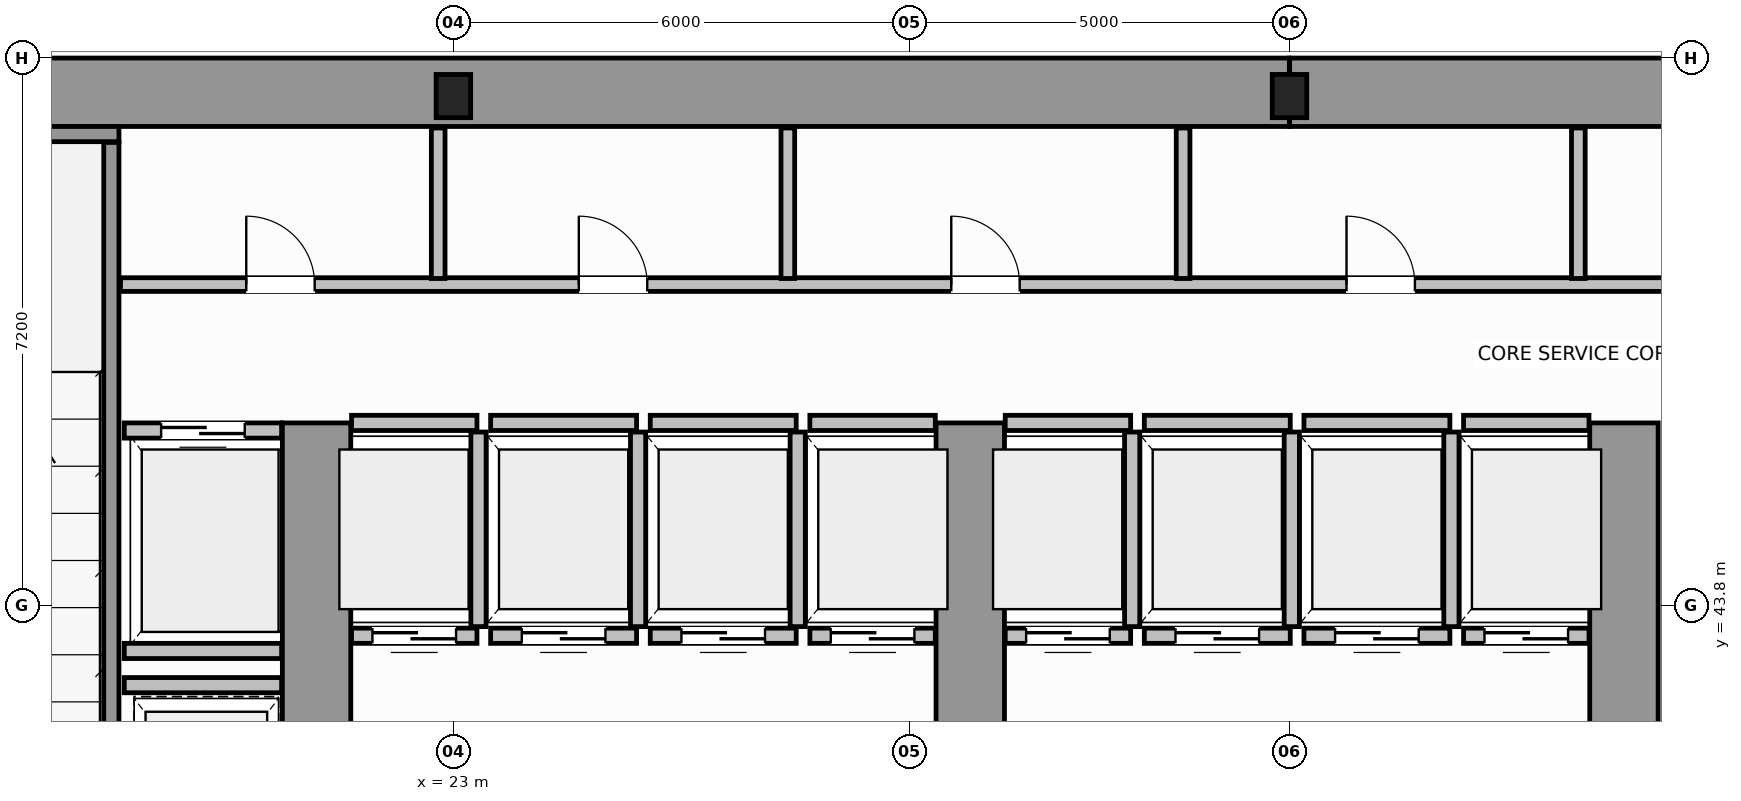
"""IFC4 building model, lengths in metres.
Left out: names, types, materials, properties, quantities, classifications, styles, units other than length and angle.
Written with IfcOpenShell. Run it as: python <this file> out.ifc"""

import sys

from ifc_helpers import new_model, si_unit, direction, frame, frame_2d, origin, origin_2d, place, context, subcontext, project, spatial, rectangle, i_section, extrude, source, transform, mapped, element, fill, save


model = new_model("IFC4")
c1 = context("Model", 3, precision=1e-05, world=origin(), true_north=direction((0.0, 1.0)))
c2 = subcontext(c1, "Body", "Model", "MODEL_VIEW")
j1 = project(units=[si_unit("LENGTHUNIT", "METRE"), si_unit("PLANEANGLEUNIT", "RADIAN")], contexts=[c1])
p1 = place(None, origin())
s1 = spatial("IfcSite", under=j1, at=p1, CompositionType="ELEMENT")
p2 = place(p1, origin())
s2 = spatial("IfcBuilding", under=s1, at=p2, CompositionType="ELEMENT")
p3 = place(p2, origin())
s3 = spatial("IfcBuildingStorey", under=s2, at=p3, CompositionType="ELEMENT", Elevation=0.0)
m1 = source(origin(), c2, "Body", "SweptSolid", [
    extrude(i_section(OverallWidth=0.454, OverallDepth=0.569, WebThickness=0.078, FlangeThickness=0.08, FilletRadius=0.015, at=origin_2d()), origin(), (0.0, 0.0, 1.0), 5.6),
])
for number, where, z_axis, x_axis in (
    (1, (23.0, 50.5, 0.0), (0.0, 0.0, 1.0), (1.0, 0.0, 0.0)),
    (2, (34.0, 50.5, 0.0), (0.0, 0.0, 1.0), (1.0, 0.0, 0.0)),
):
    element("IfcColumn", number, at=place(p3, frame(where, z_axis=z_axis, x_axis=x_axis)), inside=s3, PredefinedType="COLUMN", context=c2, shape_type="MappedRepresentation", body=[
        mapped(m1, transform((0.0, 0.0, 0.0), scale=1.0)),
    ])
for number, where, z_axis, x_axis in (
    (3, (14.454, 50.55, 0.0), (0.0, 0.0, 1.0), (1.0, 0.0, 0.0)),
    (4, (34.002, 50.55, 0.0), (0.0, 0.0, 1.0), (1.0, 0.0, 0.0)),
):
    element("IfcWall", number, at=place(p3, frame(where, z_axis=z_axis, x_axis=x_axis)), inside=s3, PredefinedType="SHEAR", context=c2, shape_type="SweptSolid", body=[
        extrude(rectangle(XDim=19.544, YDim=0.9, at=frame_2d((9.772, 0.0))), origin(), (0.0, 0.0, 1.0), 5.6),
    ])
for number, where, z_axis, x_axis in (
    (5, (21.2, 36.97, 0.0), (0.0, 0.0, 1.0), (0.0, 1.0, 0.0)),
    (6, (29.8, 36.97, 0.0), (0.0, 0.0, 1.0), (0.0, 1.0, 0.0)),
    (7, (38.4, 36.97, 0.0), (0.0, 0.0, 1.0), (0.0, 1.0, 0.0)),
):
    element("IfcWall", number, at=place(p3, frame(where, z_axis=z_axis, x_axis=x_axis)), inside=s3, PredefinedType="SHEAR", context=c2, shape_type="SweptSolid", body=[
        extrude(rectangle(XDim=9.23, YDim=0.9, at=frame_2d((4.615, 0.0))), origin(), (0.0, 0.0, 1.0), 5.6),
    ])
p4 = place(p3, frame((14.45, 50.0, 0.0), z_axis=(0.0, 0.0, 1.0), x_axis=(1.0, 0.0, 0.0)))
e8 = element("IfcWall", 8, at=p4, inside=s3, PredefinedType="SOLIDWALL", context=c2, shape_type="SweptSolid", body=[
    extrude(rectangle(XDim=4.15, YDim=0.2, at=frame_2d((2.075, 0.0))), origin(), (0.0, 0.0, 1.0), 5.6),
])
p5 = place(p3, frame((18.5, 39.96, 0.0), z_axis=(0.0, 0.0, 1.0), x_axis=(0.0, 1.0, 0.0)))
e9 = element("IfcWall", 9, at=p5, inside=s3, PredefinedType="SOLIDWALL", context=c2, shape_type="SweptSolid", body=[
    extrude(rectangle(XDim=9.93, YDim=0.2, at=frame_2d((4.965, 0.0))), origin(), (0.0, 0.0, 1.0), 5.6),
])
p6 = place(p3, frame((21.66, 43.4, 0.0), z_axis=(0.0, 0.0, 1.0), x_axis=(1.0, 0.0, 0.0)))
e10 = element("IfcWall", 10, at=p6, inside=s3, PredefinedType="SOLIDWALL", context=c2, shape_type="SweptSolid", body=[
    extrude(rectangle(XDim=1.65, YDim=0.2, at=frame_2d((0.825, 0.0))), origin(), (0.0, 0.0, 1.0), 5.32),
])
p7 = place(p6, frame((0.275, 0.0, 0.0)))
e11 = element("IfcOpeningElement", 11, at=p7, cuts=e10, PredefinedType="OPENING", context=c2, shape_type="SweptSolid", body=[
    extrude(rectangle(XDim=1.1, YDim=2.15, at=frame_2d((0.55, 1.075))), frame((0.0, 0.11, 0.0), z_axis=(0.0, -1.0, 0.0), x_axis=(1.0, 0.0, 0.0)), (0.0, 0.0, 1.0), 0.22),
])
p8 = place(p3, frame((21.66, 46.2, 0.0), z_axis=(0.0, 0.0, 1.0), x_axis=(1.0, 0.0, 0.0)))
e12 = element("IfcWall", 12, at=p8, inside=s3, PredefinedType="SOLIDWALL", context=c2, shape_type="SweptSolid", body=[
    extrude(rectangle(XDim=1.65, YDim=0.2, at=frame_2d((0.825, 0.0))), origin(), (0.0, 0.0, 1.0), 5.32),
])
p9 = place(p3, frame((23.33, 43.52, 0.0), z_axis=(0.0, 0.0, 1.0), x_axis=(0.0, 1.0, 0.0)))
e13 = element("IfcWall", 13, at=p9, inside=s3, PredefinedType="SOLIDWALL", context=c2, shape_type="SweptSolid", body=[
    extrude(rectangle(XDim=2.56, YDim=0.2, at=frame_2d((1.28, 0.0))), origin(), (0.0, 0.0, 1.0), 5.32),
])
p10 = place(p3, frame((23.49, 43.4, 0.0), z_axis=(0.0, 0.0, 1.0), x_axis=(1.0, 0.0, 0.0)))
e14 = element("IfcWall", 14, at=p10, inside=s3, PredefinedType="SOLIDWALL", context=c2, shape_type="SweptSolid", body=[
    extrude(rectangle(XDim=1.92, YDim=0.2, at=frame_2d((0.96, 0.0))), origin(), (0.0, 0.0, 1.0), 5.32),
])
p11 = place(p10, frame((0.41, 0.0, 0.0)))
e15 = element("IfcOpeningElement", 15, at=p11, cuts=e14, PredefinedType="OPENING", context=c2, shape_type="SweptSolid", body=[
    extrude(rectangle(XDim=1.1, YDim=2.15, at=frame_2d((0.55, 1.075))), frame((0.0, 0.11, 0.0), z_axis=(0.0, -1.0, 0.0), x_axis=(1.0, 0.0, 0.0)), (0.0, 0.0, 1.0), 0.22),
])
p12 = place(p3, frame((23.49, 46.2, 0.0), z_axis=(0.0, 0.0, 1.0), x_axis=(1.0, 0.0, 0.0)))
e16 = element("IfcWall", 16, at=p12, inside=s3, PredefinedType="SOLIDWALL", context=c2, shape_type="SweptSolid", body=[
    extrude(rectangle(XDim=1.92, YDim=0.2, at=frame_2d((0.96, 0.0))), origin(), (0.0, 0.0, 1.0), 5.32),
])
p13 = place(p3, frame((25.43, 43.52, 0.0), z_axis=(0.0, 0.0, 1.0), x_axis=(0.0, 1.0, 0.0)))
e17 = element("IfcWall", 17, at=p13, inside=s3, PredefinedType="SOLIDWALL", context=c2, shape_type="SweptSolid", body=[
    extrude(rectangle(XDim=2.56, YDim=0.2, at=frame_2d((1.28, 0.0))), origin(), (0.0, 0.0, 1.0), 5.32),
])
p14 = place(p3, frame((25.59, 43.4, 0.0), z_axis=(0.0, 0.0, 1.0), x_axis=(1.0, 0.0, 0.0)))
e18 = element("IfcWall", 18, at=p14, inside=s3, PredefinedType="SOLIDWALL", context=c2, shape_type="SweptSolid", body=[
    extrude(rectangle(XDim=1.92, YDim=0.2, at=frame_2d((0.96, 0.0))), origin(), (0.0, 0.0, 1.0), 5.32),
])
p15 = place(p14, frame((0.41, 0.0, 0.0)))
e19 = element("IfcOpeningElement", 19, at=p15, cuts=e18, PredefinedType="OPENING", context=c2, shape_type="SweptSolid", body=[
    extrude(rectangle(XDim=1.1, YDim=2.15, at=frame_2d((0.55, 1.075))), frame((0.0, 0.11, 0.0), z_axis=(0.0, -1.0, 0.0), x_axis=(1.0, 0.0, 0.0)), (0.0, 0.0, 1.0), 0.22),
])
p16 = place(p3, frame((25.59, 46.2, 0.0), z_axis=(0.0, 0.0, 1.0), x_axis=(1.0, 0.0, 0.0)))
e20 = element("IfcWall", 20, at=p16, inside=s3, PredefinedType="SOLIDWALL", context=c2, shape_type="SweptSolid", body=[
    extrude(rectangle(XDim=1.92, YDim=0.2, at=frame_2d((0.96, 0.0))), origin(), (0.0, 0.0, 1.0), 5.32),
])
p17 = place(p3, frame((27.53, 43.52, 0.0), z_axis=(0.0, 0.0, 1.0), x_axis=(0.0, 1.0, 0.0)))
e21 = element("IfcWall", 21, at=p17, inside=s3, PredefinedType="SOLIDWALL", context=c2, shape_type="SweptSolid", body=[
    extrude(rectangle(XDim=2.56, YDim=0.2, at=frame_2d((1.28, 0.0))), origin(), (0.0, 0.0, 1.0), 5.32),
])
p18 = place(p3, frame((27.69, 43.4, 0.0), z_axis=(0.0, 0.0, 1.0), x_axis=(1.0, 0.0, 0.0)))
e22 = element("IfcWall", 22, at=p18, inside=s3, PredefinedType="SOLIDWALL", context=c2, shape_type="SweptSolid", body=[
    extrude(rectangle(XDim=1.65, YDim=0.2, at=frame_2d((0.825, 0.0))), origin(), (0.0, 0.0, 1.0), 5.32),
])
p19 = place(p18, frame((0.275, 0.0, 0.0)))
e23 = element("IfcOpeningElement", 23, at=p19, cuts=e22, PredefinedType="OPENING", context=c2, shape_type="SweptSolid", body=[
    extrude(rectangle(XDim=1.1, YDim=2.15, at=frame_2d((0.55, 1.075))), frame((0.0, 0.11, 0.0), z_axis=(0.0, -1.0, 0.0), x_axis=(1.0, 0.0, 0.0)), (0.0, 0.0, 1.0), 0.22),
])
p20 = place(p3, frame((27.69, 46.2, 0.0), z_axis=(0.0, 0.0, 1.0), x_axis=(1.0, 0.0, 0.0)))
e24 = element("IfcWall", 24, at=p20, inside=s3, PredefinedType="SOLIDWALL", context=c2, shape_type="SweptSolid", body=[
    extrude(rectangle(XDim=1.65, YDim=0.2, at=frame_2d((0.825, 0.0))), origin(), (0.0, 0.0, 1.0), 5.32),
])
p21 = place(p3, frame((30.26, 43.4, 0.0), z_axis=(0.0, 0.0, 1.0), x_axis=(1.0, 0.0, 0.0)))
e25 = element("IfcWall", 25, at=p21, inside=s3, PredefinedType="SOLIDWALL", context=c2, shape_type="SweptSolid", body=[
    extrude(rectangle(XDim=1.65, YDim=0.2, at=frame_2d((0.825, 0.0))), origin(), (0.0, 0.0, 1.0), 5.32),
])
p22 = place(p21, frame((0.275, 0.0, 0.0)))
e26 = element("IfcOpeningElement", 26, at=p22, cuts=e25, PredefinedType="OPENING", context=c2, shape_type="SweptSolid", body=[
    extrude(rectangle(XDim=1.1, YDim=2.15, at=frame_2d((0.55, 1.075))), frame((0.0, 0.11, 0.0), z_axis=(0.0, -1.0, 0.0), x_axis=(1.0, 0.0, 0.0)), (0.0, 0.0, 1.0), 0.22),
])
p23 = place(p3, frame((30.26, 46.2, 0.0), z_axis=(0.0, 0.0, 1.0), x_axis=(1.0, 0.0, 0.0)))
e27 = element("IfcWall", 27, at=p23, inside=s3, PredefinedType="SOLIDWALL", context=c2, shape_type="SweptSolid", body=[
    extrude(rectangle(XDim=1.65, YDim=0.2, at=frame_2d((0.825, 0.0))), origin(), (0.0, 0.0, 1.0), 5.32),
])
p24 = place(p3, frame((31.93, 43.52, 0.0), z_axis=(0.0, 0.0, 1.0), x_axis=(0.0, 1.0, 0.0)))
e28 = element("IfcWall", 28, at=p24, inside=s3, PredefinedType="SOLIDWALL", context=c2, shape_type="SweptSolid", body=[
    extrude(rectangle(XDim=2.56, YDim=0.2, at=frame_2d((1.28, 0.0))), origin(), (0.0, 0.0, 1.0), 5.32),
])
p25 = place(p3, frame((32.09, 43.4, 0.0), z_axis=(0.0, 0.0, 1.0), x_axis=(1.0, 0.0, 0.0)))
e29 = element("IfcWall", 29, at=p25, inside=s3, PredefinedType="SOLIDWALL", context=c2, shape_type="SweptSolid", body=[
    extrude(rectangle(XDim=1.92, YDim=0.2, at=frame_2d((0.96, 0.0))), origin(), (0.0, 0.0, 1.0), 5.32),
])
p26 = place(p25, frame((0.41, 0.0, 0.0)))
e30 = element("IfcOpeningElement", 30, at=p26, cuts=e29, PredefinedType="OPENING", context=c2, shape_type="SweptSolid", body=[
    extrude(rectangle(XDim=1.1, YDim=2.15, at=frame_2d((0.55, 1.075))), frame((0.0, 0.11, 0.0), z_axis=(0.0, -1.0, 0.0), x_axis=(1.0, 0.0, 0.0)), (0.0, 0.0, 1.0), 0.22),
])
p27 = place(p3, frame((32.09, 46.2, 0.0), z_axis=(0.0, 0.0, 1.0), x_axis=(1.0, 0.0, 0.0)))
e31 = element("IfcWall", 31, at=p27, inside=s3, PredefinedType="SOLIDWALL", context=c2, shape_type="SweptSolid", body=[
    extrude(rectangle(XDim=1.92, YDim=0.2, at=frame_2d((0.96, 0.0))), origin(), (0.0, 0.0, 1.0), 5.32),
])
p28 = place(p3, frame((34.03, 43.52, 0.0), z_axis=(0.0, 0.0, 1.0), x_axis=(0.0, 1.0, 0.0)))
e32 = element("IfcWall", 32, at=p28, inside=s3, PredefinedType="SOLIDWALL", context=c2, shape_type="SweptSolid", body=[
    extrude(rectangle(XDim=2.56, YDim=0.2, at=frame_2d((1.28, 0.0))), origin(), (0.0, 0.0, 1.0), 5.32),
])
p29 = place(p3, frame((34.19, 43.4, 0.0), z_axis=(0.0, 0.0, 1.0), x_axis=(1.0, 0.0, 0.0)))
e33 = element("IfcWall", 33, at=p29, inside=s3, PredefinedType="SOLIDWALL", context=c2, shape_type="SweptSolid", body=[
    extrude(rectangle(XDim=1.92, YDim=0.2, at=frame_2d((0.96, 0.0))), origin(), (0.0, 0.0, 1.0), 5.32),
])
p30 = place(p29, frame((0.41, 0.0, 0.0)))
e34 = element("IfcOpeningElement", 34, at=p30, cuts=e33, PredefinedType="OPENING", context=c2, shape_type="SweptSolid", body=[
    extrude(rectangle(XDim=1.1, YDim=2.15, at=frame_2d((0.55, 1.075))), frame((0.0, 0.11, 0.0), z_axis=(0.0, -1.0, 0.0), x_axis=(1.0, 0.0, 0.0)), (0.0, 0.0, 1.0), 0.22),
])
p31 = place(p3, frame((34.19, 46.2, 0.0), z_axis=(0.0, 0.0, 1.0), x_axis=(1.0, 0.0, 0.0)))
e35 = element("IfcWall", 35, at=p31, inside=s3, PredefinedType="SOLIDWALL", context=c2, shape_type="SweptSolid", body=[
    extrude(rectangle(XDim=1.92, YDim=0.2, at=frame_2d((0.96, 0.0))), origin(), (0.0, 0.0, 1.0), 5.32),
])
p32 = place(p3, frame((36.13, 43.52, 0.0), z_axis=(0.0, 0.0, 1.0), x_axis=(0.0, 1.0, 0.0)))
e36 = element("IfcWall", 36, at=p32, inside=s3, PredefinedType="SOLIDWALL", context=c2, shape_type="SweptSolid", body=[
    extrude(rectangle(XDim=2.56, YDim=0.2, at=frame_2d((1.28, 0.0))), origin(), (0.0, 0.0, 1.0), 5.32),
])
p33 = place(p3, frame((36.29, 43.4, 0.0), z_axis=(0.0, 0.0, 1.0), x_axis=(1.0, 0.0, 0.0)))
e37 = element("IfcWall", 37, at=p33, inside=s3, PredefinedType="SOLIDWALL", context=c2, shape_type="SweptSolid", body=[
    extrude(rectangle(XDim=1.65, YDim=0.2, at=frame_2d((0.825, 0.0))), origin(), (0.0, 0.0, 1.0), 5.32),
])
p34 = place(p33, frame((0.275, 0.0, 0.0)))
e38 = element("IfcOpeningElement", 38, at=p34, cuts=e37, PredefinedType="OPENING", context=c2, shape_type="SweptSolid", body=[
    extrude(rectangle(XDim=1.1, YDim=2.15, at=frame_2d((0.55, 1.075))), frame((0.0, 0.11, 0.0), z_axis=(0.0, -1.0, 0.0), x_axis=(1.0, 0.0, 0.0)), (0.0, 0.0, 1.0), 0.22),
])
p35 = place(p3, frame((36.29, 46.2, 0.0), z_axis=(0.0, 0.0, 1.0), x_axis=(1.0, 0.0, 0.0)))
e39 = element("IfcWall", 39, at=p35, inside=s3, PredefinedType="SOLIDWALL", context=c2, shape_type="SweptSolid", body=[
    extrude(rectangle(XDim=1.65, YDim=0.2, at=frame_2d((0.825, 0.0))), origin(), (0.0, 0.0, 1.0), 5.32),
])
p36 = place(p3, frame((18.67, 46.1, 0.0), z_axis=(0.0, 0.0, 1.0), x_axis=(1.0, 0.0, 0.0)))
e40 = element("IfcWall", 40, at=p36, inside=s3, PredefinedType="SOLIDWALL", context=c2, shape_type="SweptSolid", body=[
    extrude(rectangle(XDim=2.07, YDim=0.2, at=frame_2d((1.035, 0.0))), origin(), (0.0, 0.0, 1.0), 5.32),
])
p37 = place(p36, frame((0.485, 0.0, 0.0)))
e41 = element("IfcOpeningElement", 41, at=p37, cuts=e40, PredefinedType="OPENING", context=c2, shape_type="SweptSolid", body=[
    extrude(rectangle(XDim=1.1, YDim=2.15, at=frame_2d((0.55, 1.075))), frame((0.0, 0.11, 0.0), z_axis=(0.0, -1.0, 0.0), x_axis=(1.0, 0.0, 0.0)), (0.0, 0.0, 1.0), 0.22),
])
for number, where, z_axis, x_axis in (
    (42, (18.67, 43.2, 0.0), (0.0, 0.0, 1.0), (1.0, 0.0, 0.0)),
    (43, (18.67, 42.75, 0.0), (0.0, 0.0, 1.0), (1.0, 0.0, 0.0)),
):
    element("IfcWall", number, at=place(p3, frame(where, z_axis=z_axis, x_axis=x_axis)), inside=s3, PredefinedType="SOLIDWALL", context=c2, shape_type="SweptSolid", body=[
        extrude(rectangle(XDim=2.07, YDim=0.2, at=frame_2d((1.035, 0.0))), origin(), (0.0, 0.0, 1.0), 5.32),
    ])
p38 = place(p3, frame((18.62, 48.02, 0.0), z_axis=(0.0, 0.0, 1.0), x_axis=(1.0, 0.0, 0.0)))
e44 = element("IfcWall", 44, at=p38, inside=s3, PredefinedType="PLUMBINGWALL", context=c2, shape_type="SweptSolid", body=[
    extrude(rectangle(XDim=30.76, YDim=0.18, at=frame_2d((15.38, 0.0))), origin(), (0.0, 0.0, 1.0), 5.32),
])
p39 = place(p38, frame((1.655, 0.0, 0.0)))
e45 = element("IfcOpeningElement", 45, at=p39, cuts=e44, PredefinedType="OPENING", context=c2, shape_type="SweptSolid", body=[
    extrude(rectangle(XDim=0.9, YDim=2.15, at=frame_2d((0.45, 1.075))), frame((0.0, 0.1, 0.0), z_axis=(0.0, -1.0, 0.0), x_axis=(1.0, 0.0, 0.0)), (0.0, 0.0, 1.0), 0.2),
])
p40 = place(p38, frame((6.03, 0.0, 0.0)))
e46 = element("IfcOpeningElement", 46, at=p40, cuts=e44, PredefinedType="OPENING", context=c2, shape_type="SweptSolid", body=[
    extrude(rectangle(XDim=0.9, YDim=2.15, at=frame_2d((0.45, 1.075))), frame((0.0, 0.1, 0.0), z_axis=(0.0, -1.0, 0.0), x_axis=(1.0, 0.0, 0.0)), (0.0, 0.0, 1.0), 0.2),
])
p41 = place(p38, frame((10.93, 0.0, 0.0)))
e47 = element("IfcOpeningElement", 47, at=p41, cuts=e44, PredefinedType="OPENING", context=c2, shape_type="SweptSolid", body=[
    extrude(rectangle(XDim=0.9, YDim=2.15, at=frame_2d((0.45, 1.075))), frame((0.0, 0.1, 0.0), z_axis=(0.0, -1.0, 0.0), x_axis=(1.0, 0.0, 0.0)), (0.0, 0.0, 1.0), 0.2),
])
p42 = place(p38, frame((16.13, 0.0, 0.0)))
e48 = element("IfcOpeningElement", 48, at=p42, cuts=e44, PredefinedType="OPENING", context=c2, shape_type="SweptSolid", body=[
    extrude(rectangle(XDim=0.9, YDim=2.15, at=frame_2d((0.45, 1.075))), frame((0.0, 0.1, 0.0), z_axis=(0.0, -1.0, 0.0), x_axis=(1.0, 0.0, 0.0)), (0.0, 0.0, 1.0), 0.2),
])
p43 = place(p38, frame((21.73, 0.0, 0.0)))
e49 = element("IfcOpeningElement", 49, at=p43, cuts=e44, PredefinedType="OPENING", context=c2, shape_type="SweptSolid", body=[
    extrude(rectangle(XDim=0.9, YDim=2.15, at=frame_2d((0.45, 1.075))), frame((0.0, 0.1, 0.0), z_axis=(0.0, -1.0, 0.0), x_axis=(1.0, 0.0, 0.0)), (0.0, 0.0, 1.0), 0.2),
])
p44 = place(p38, frame((27.505, 0.0, 0.0)))
e50 = element("IfcOpeningElement", 50, at=p44, cuts=e44, PredefinedType="OPENING", context=c2, shape_type="SweptSolid", body=[
    extrude(rectangle(XDim=0.9, YDim=2.15, at=frame_2d((0.45, 1.075))), frame((0.0, 0.1, 0.0), z_axis=(0.0, -1.0, 0.0), x_axis=(1.0, 0.0, 0.0)), (0.0, 0.0, 1.0), 0.2),
])
p45 = place(p3, frame((22.8, 48.1, 0.0), z_axis=(0.0, 0.0, 1.0), x_axis=(0.0, 1.0, 0.0)))
e51 = element("IfcWall", 51, at=p45, inside=s3, PredefinedType="PLUMBINGWALL", context=c2, shape_type="SweptSolid", body=[
    extrude(rectangle(XDim=1.98, YDim=0.18, at=frame_2d((0.99, 0.0))), origin(), (0.0, 0.0, 1.0), 4.4),
])
for number, where, z_axis, x_axis in (
    (52, (27.4, 48.1, 0.0), (0.0, 0.0, 1.0), (0.0, 1.0, 0.0)),
    (53, (32.6, 48.1, 0.0), (0.0, 0.0, 1.0), (0.0, 1.0, 0.0)),
    (54, (37.8, 48.1, 0.0), (0.0, 0.0, 1.0), (0.0, 1.0, 0.0)),
):
    element("IfcWall", number, at=place(p3, frame(where, z_axis=z_axis, x_axis=x_axis)), inside=s3, PredefinedType="PLUMBINGWALL", context=c2, shape_type="SweptSolid", body=[
        extrude(rectangle(XDim=1.98, YDim=0.18, at=frame_2d((0.99, 0.0))), origin(), (0.0, 0.0, 1.0), 5.32),
    ])
m2 = source(origin(), c2, "Body", "SweptSolid", [
    extrude(rectangle(XDim=1.1, YDim=2.15, at=frame_2d((0.55, 1.075))), frame((0.0, 0.025, 0.0), z_axis=(0.0, -1.0, 0.0), x_axis=(1.0, 0.0, 0.0)), (0.0, 0.0, 1.0), 0.05),
])
p46 = place(p7, origin())
e55 = element("IfcDoor", 55, at=p46, inside=s3, OperationType="DOUBLE_DOOR_SLIDING", PredefinedType="DOOR", context=c2, shape_type="MappedRepresentation", body=[
    mapped(m2, transform((0.0, 0.0, 0.0), scale=1.0)),
])
fill(e11, e55)
p47 = place(p11, origin())
e56 = element("IfcDoor", 56, at=p47, inside=s3, OperationType="DOUBLE_DOOR_SLIDING", PredefinedType="DOOR", context=c2, shape_type="MappedRepresentation", body=[
    mapped(m2, transform((0.0, 0.0, 0.0), scale=1.0)),
])
fill(e15, e56)
p48 = place(p15, origin())
e57 = element("IfcDoor", 57, at=p48, inside=s3, OperationType="DOUBLE_DOOR_SLIDING", PredefinedType="DOOR", context=c2, shape_type="MappedRepresentation", body=[
    mapped(m2, transform((0.0, 0.0, 0.0), scale=1.0)),
])
fill(e19, e57)
p49 = place(p19, origin())
e58 = element("IfcDoor", 58, at=p49, inside=s3, OperationType="DOUBLE_DOOR_SLIDING", PredefinedType="DOOR", context=c2, shape_type="MappedRepresentation", body=[
    mapped(m2, transform((0.0, 0.0, 0.0), scale=1.0)),
])
fill(e23, e58)
p50 = place(p22, origin())
e59 = element("IfcDoor", 59, at=p50, inside=s3, OperationType="DOUBLE_DOOR_SLIDING", PredefinedType="DOOR", context=c2, shape_type="MappedRepresentation", body=[
    mapped(m2, transform((0.0, 0.0, 0.0), scale=1.0)),
])
fill(e26, e59)
p51 = place(p26, origin())
e60 = element("IfcDoor", 60, at=p51, inside=s3, OperationType="DOUBLE_DOOR_SLIDING", PredefinedType="DOOR", context=c2, shape_type="MappedRepresentation", body=[
    mapped(m2, transform((0.0, 0.0, 0.0), scale=1.0)),
])
fill(e30, e60)
p52 = place(p30, origin())
e61 = element("IfcDoor", 61, at=p52, inside=s3, OperationType="DOUBLE_DOOR_SLIDING", PredefinedType="DOOR", context=c2, shape_type="MappedRepresentation", body=[
    mapped(m2, transform((0.0, 0.0, 0.0), scale=1.0)),
])
fill(e34, e61)
p53 = place(p34, origin())
e62 = element("IfcDoor", 62, at=p53, inside=s3, OperationType="DOUBLE_DOOR_SLIDING", PredefinedType="DOOR", context=c2, shape_type="MappedRepresentation", body=[
    mapped(m2, transform((0.0, 0.0, 0.0), scale=1.0)),
])
fill(e38, e62)
p54 = place(p37, origin())
e63 = element("IfcDoor", 63, at=p54, inside=s3, OperationType="DOUBLE_DOOR_SLIDING", PredefinedType="DOOR", context=c2, shape_type="MappedRepresentation", body=[
    mapped(m2, transform((0.0, 0.0, 0.0), scale=1.0)),
])
fill(e41, e63)
m3 = source(origin(), c2, "Body", "SweptSolid", [
    extrude(rectangle(XDim=0.9, YDim=2.15, at=frame_2d((0.45, 1.075))), frame((0.0, 0.025, 0.0), z_axis=(0.0, -1.0, 0.0), x_axis=(1.0, 0.0, 0.0)), (0.0, 0.0, 1.0), 0.05),
])
p55 = place(p39, origin())
e64 = element("IfcDoor", 64, at=p55, inside=s3, OperationType="SINGLE_SWING_LEFT", PredefinedType="DOOR", context=c2, shape_type="MappedRepresentation", body=[
    mapped(m3, transform((0.0, 0.0, 0.0), scale=1.0)),
])
fill(e45, e64)
p56 = place(p40, origin())
e65 = element("IfcDoor", 65, at=p56, inside=s3, OperationType="SINGLE_SWING_RIGHT", PredefinedType="DOOR", context=c2, shape_type="MappedRepresentation", body=[
    mapped(m3, transform((0.0, 0.0, 0.0), scale=1.0)),
])
fill(e46, e65)
p57 = place(p41, origin())
e66 = element("IfcDoor", 66, at=p57, inside=s3, OperationType="SINGLE_SWING_LEFT", PredefinedType="DOOR", context=c2, shape_type="MappedRepresentation", body=[
    mapped(m3, transform((0.0, 0.0, 0.0), scale=1.0)),
])
fill(e47, e66)
p58 = place(p42, origin())
e67 = element("IfcDoor", 67, at=p58, inside=s3, OperationType="SINGLE_SWING_RIGHT", PredefinedType="DOOR", context=c2, shape_type="MappedRepresentation", body=[
    mapped(m3, transform((0.0, 0.0, 0.0), scale=1.0)),
])
fill(e48, e67)
save(model, sys.argv[1])
